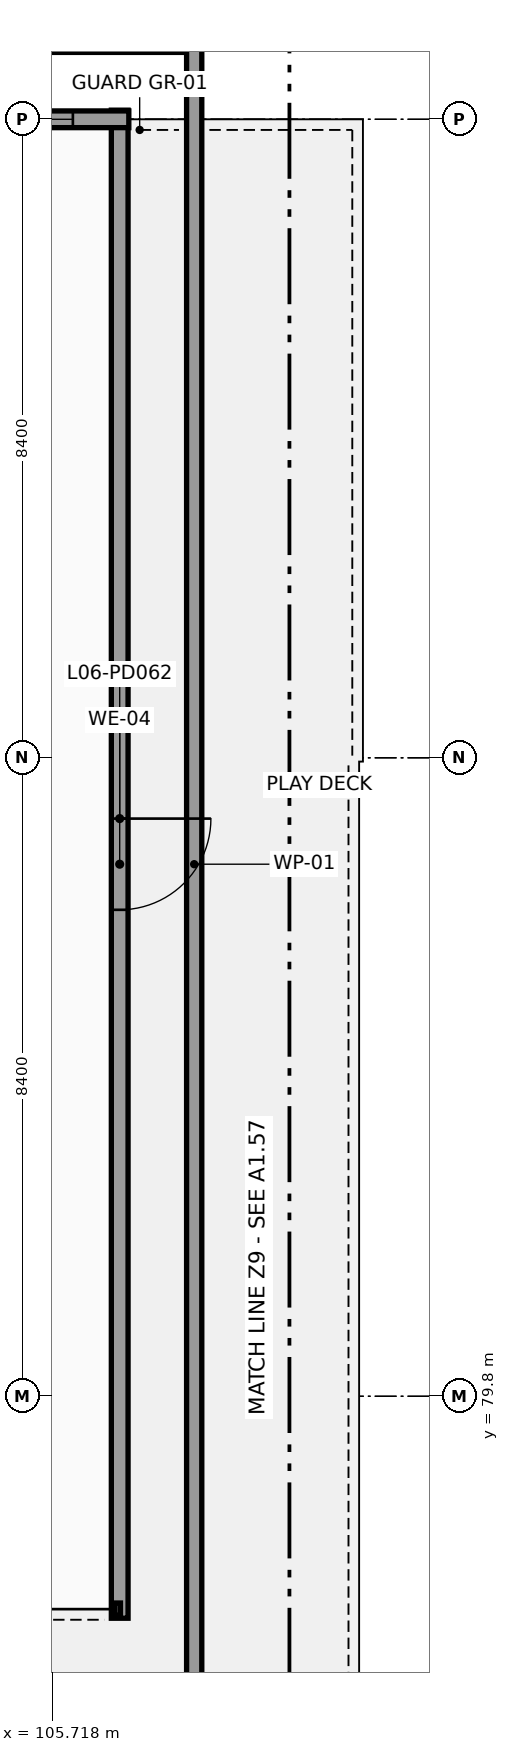
"""IFC4 building model, lengths in metres.
Left out: names, types, materials, properties, quantities, classifications, styles, units other than length and angle.
Written with IfcOpenShell. Run it as: python <this file> out.ifc"""

import sys

from ifc_helpers import new_model, si_unit, direction, frame, frame_2d, origin, place, context, subcontext, project, spatial, rectangle, extrude, element, fill, save


model = new_model("IFC4")
c1 = context("Model", 3, precision=1e-05, world=origin(), true_north=direction((0.0, 1.0)))
c2 = subcontext(c1, "Body", "Model", "MODEL_VIEW")
j1 = project(units=[si_unit("LENGTHUNIT", "METRE"), si_unit("PLANEANGLEUNIT", "RADIAN")], contexts=[c1])
p1 = place(None, origin())
s1 = spatial("IfcSite", under=j1, at=p1, CompositionType="ELEMENT")
p2 = place(p1, origin())
s2 = spatial("IfcBuilding", under=s1, at=p2, CompositionType="ELEMENT")
p3 = place(p2, frame((0.0, 0.0, 22.2)))
s3 = spatial("IfcBuildingStorey", under=s2, at=p3, CompositionType="ELEMENT", Elevation=22.2)
p4 = place(p3, frame((106.6, 96.72, 0.0), z_axis=(0.0, 0.0, 1.0), x_axis=(0.0, -1.0, 0.0)))
e1 = element("IfcWall", 1, at=p4, inside=s3, PredefinedType="SOLIDWALL", context=c2, shape_type="SweptSolid", body=[
    extrude(rectangle(XDim=19.84, YDim=0.22, at=frame_2d((9.92, 0.0))), origin(), (0.0, 0.0, 1.0), 3.38),
])
p5 = place(p4, frame((9.32, 0.0, 0.0)))
e2 = element("IfcOpeningElement", 2, at=p5, cuts=e1, PredefinedType="OPENING", context=c2, shape_type="SweptSolid", body=[
    extrude(rectangle(XDim=1.2, YDim=2.15, at=frame_2d((0.6, 1.075))), frame((0.0, 0.12, 0.0), z_axis=(0.0, -1.0, 0.0), x_axis=(1.0, 0.0, 0.0)), (0.0, 0.0, 1.0), 0.24),
])
p6 = place(p3, frame((102.848, 96.6, 0.0), z_axis=(0.0, 0.0, 1.0), x_axis=(1.0, 0.0, 0.0)))
e3 = element("IfcWall", 3, at=p6, inside=s3, PredefinedType="SOLIDWALL", context=c2, shape_type="SweptSolid", body=[
    extrude(rectangle(XDim=3.872, YDim=0.22, at=frame_2d((1.936, 0.0))), origin(), (0.0, 0.0, 1.0), 3.38),
])
p7 = place(p6, frame((0.736, 0.0, 0.95)))
e4 = element("IfcOpeningElement", 4, at=p7, cuts=e3, PredefinedType="OPENING", context=c2, shape_type="SweptSolid", body=[
    extrude(rectangle(XDim=2.4, YDim=1.2, at=frame_2d((1.2, 0.6))), frame((0.0, 0.12, 0.0), z_axis=(0.0, -1.0, 0.0), x_axis=(1.0, 0.0, 0.0)), (0.0, 0.0, 1.0), 0.24),
])
p8 = place(p3, frame((107.58, 97.58, 3.6), z_axis=(0.0, 0.0, 1.0), x_axis=(0.0, -1.0, 0.0)))
e5 = element("IfcWall", 5, at=p8, inside=s3, PredefinedType="PARAPET", context=c2, shape_type="SweptSolid", body=[
    extrude(rectangle(XDim=21.56, YDim=0.2, at=frame_2d((10.78, 0.0))), origin(), (0.0, 0.0, 1.0), 1.1),
])
p9 = place(p5, origin())
e6 = element("IfcDoor", 6, at=p9, inside=s3, OperationType="SINGLE_SWING_LEFT", PredefinedType="DOOR", context=c2, shape_type="SweptSolid", body=[
    extrude(rectangle(XDim=1.2, YDim=2.15, at=frame_2d((0.6, 1.075))), frame((0.0, 0.025, 0.0), z_axis=(0.0, -1.0, 0.0), x_axis=(1.0, 0.0, 0.0)), (0.0, 0.0, 1.0), 0.05),
])
fill(e2, e6)
p10 = place(p7, origin())
e7 = element("IfcWindow", 7, at=p10, inside=s3, PartitioningType="SINGLE_PANEL", PredefinedType="WINDOW", context=c2, shape_type="SweptSolid", body=[
    extrude(rectangle(XDim=2.4, YDim=1.2, at=frame_2d((1.2, 0.6))), frame((0.0, 0.03, 0.0), z_axis=(0.0, -1.0, 0.0), x_axis=(1.0, 0.0, 0.0)), (0.0, 0.0, 1.0), 0.06),
])
fill(e4, e7)
save(model, sys.argv[1])
